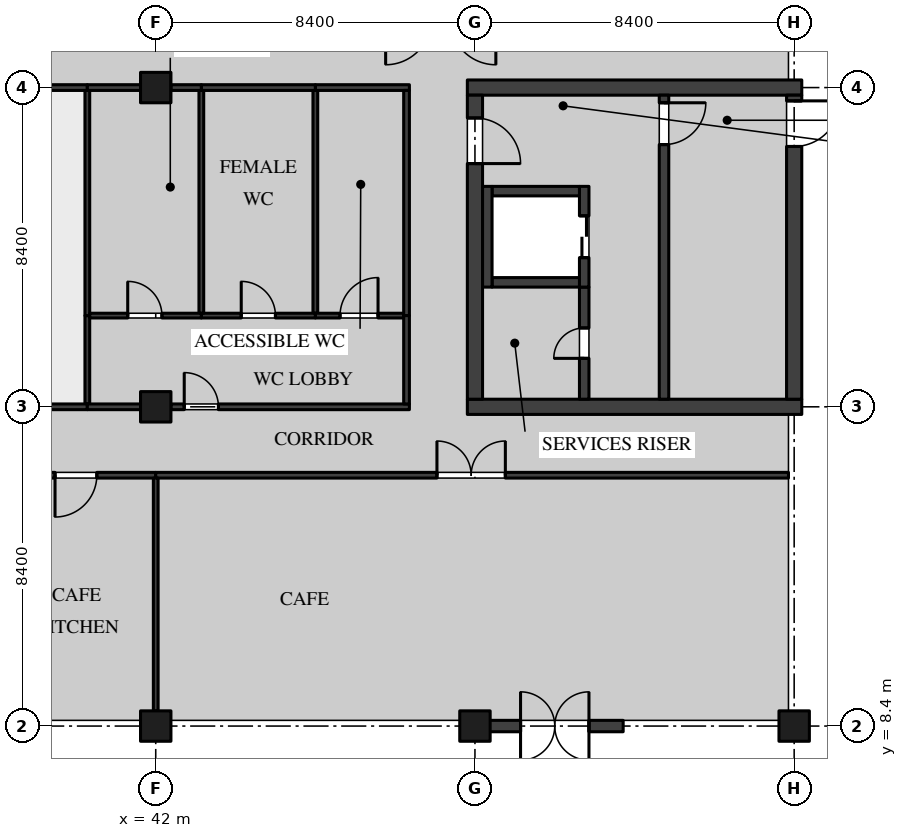
"""IFC4 building model, lengths in metres.
Left out: names, types, materials, properties, quantities, classifications, styles, units other than length and angle.
Written with IfcOpenShell. Run it as: python <this file> out.ifc"""

import sys

from ifc_helpers import new_model, si_unit, direction, frame, frame_2d, origin, origin_2d, place, context, subcontext, project, spatial, rectangle, extrude, element, fill, save


model = new_model("IFC4")
c1 = context("Model", 3, precision=1e-05, world=origin(), true_north=direction((0.0, 1.0)))
c2 = subcontext(c1, "Body", "Model", "MODEL_VIEW")
j1 = project(units=[si_unit("LENGTHUNIT", "METRE"), si_unit("PLANEANGLEUNIT", "RADIAN")], contexts=[c1])
p1 = place(None, origin())
s1 = spatial("IfcSite", under=j1, at=p1, CompositionType="ELEMENT")
p2 = place(p1, origin())
s2 = spatial("IfcBuilding", under=s1, at=p2, CompositionType="ELEMENT")
p3 = place(p2, origin())
s3 = spatial("IfcBuildingStorey", under=s2, at=p3, CompositionType="ELEMENT", Elevation=0.0)
for number, where, z_axis, x_axis in (
    (1, (42.0, 8.4, 0.0), (0.0, 0.0, 1.0), (1.0, 0.0, 0.0)),
    (2, (42.0, 16.8, 0.0), (0.0, 0.0, 1.0), (1.0, 0.0, 0.0)),
    (3, (42.0, 25.2, 0.0), (0.0, 0.0, 1.0), (1.0, 0.0, 0.0)),
    (4, (50.4, 8.4, 0.0), (0.0, 0.0, 1.0), (1.0, 0.0, 0.0)),
    (5, (58.8, 8.4, 0.0), (0.0, 0.0, 1.0), (1.0, 0.0, 0.0)),
):
    element("IfcColumn", number, at=place(p3, frame(where, z_axis=z_axis, x_axis=x_axis)), inside=s3, PredefinedType="COLUMN", context=c2, shape_type="SweptSolid", body=[
        extrude(rectangle(XDim=0.8, YDim=0.8, at=origin_2d()), origin(), (0.0, 0.0, 1.0), 5.05),
    ])
for number, where, z_axis, x_axis in (
    (6, (50.2, 16.8, 0.0), (0.0, 0.0, 1.0), (1.0, 0.0, 0.0)),
    (7, (50.2, 25.2, 0.0), (0.0, 0.0, 1.0), (1.0, 0.0, 0.0)),
):
    element("IfcWall", number, at=place(p3, frame(where, z_axis=z_axis, x_axis=x_axis)), inside=s3, PredefinedType="SHEAR", context=c2, shape_type="SweptSolid", body=[
        extrude(rectangle(XDim=8.8, YDim=0.4, at=frame_2d((4.4, 0.0))), origin(), (0.0, 0.0, 1.0), 5.05),
    ])
p4 = place(p3, frame((50.4, 17.0, 0.0), z_axis=(0.0, 0.0, 1.0), x_axis=(0.0, 1.0, 0.0)))
e8 = element("IfcWall", 8, at=p4, inside=s3, PredefinedType="SHEAR", context=c2, shape_type="SweptSolid", body=[
    extrude(rectangle(XDim=8.0, YDim=0.4, at=frame_2d((4.0, 0.0))), origin(), (0.0, 0.0, 1.0), 5.05),
])
p5 = place(p4, frame((6.2, 0.0, 0.0)))
e9 = element("IfcOpeningElement", 9, at=p5, cuts=e8, PredefinedType="OPENING", context=c2, shape_type="SweptSolid", body=[
    extrude(rectangle(XDim=1.2, YDim=2.1, at=frame_2d((0.6, 1.05))), frame((0.0, 0.21, 0.0), z_axis=(0.0, -1.0, 0.0), x_axis=(1.0, 0.0, 0.0)), (0.0, 0.0, 1.0), 0.42),
])
p6 = place(p3, frame((58.8, 17.0, 0.0), z_axis=(0.0, 0.0, 1.0), x_axis=(0.0, 1.0, 0.0)))
e10 = element("IfcWall", 10, at=p6, inside=s3, PredefinedType="SHEAR", context=c2, shape_type="SweptSolid", body=[
    extrude(rectangle(XDim=8.0, YDim=0.4, at=frame_2d((4.0, 0.0))), origin(), (0.0, 0.0, 1.0), 5.05),
])
p7 = place(p6, frame((6.65, 0.0, 0.0)))
e11 = element("IfcOpeningElement", 11, at=p7, cuts=e10, PredefinedType="OPENING", context=c2, shape_type="SweptSolid", body=[
    extrude(rectangle(XDim=1.2, YDim=2.1, at=frame_2d((0.6, 1.05))), frame((0.0, 0.21, 0.0), z_axis=(0.0, -1.0, 0.0), x_axis=(1.0, 0.0, 0.0)), (0.0, 0.0, 1.0), 0.42),
])
p8 = place(p3, frame((55.375, 25.0, 0.0), z_axis=(0.0, 0.0, 1.0), x_axis=(0.0, -1.0, 0.0)))
e12 = element("IfcWall", 12, at=p8, inside=s3, PredefinedType="SOLIDWALL", context=c2, shape_type="SweptSolid", body=[
    extrude(rectangle(XDim=8.0, YDim=0.25, at=frame_2d((4.0, 0.0))), origin(), (0.0, 0.0, 1.0), 5.05),
])
p9 = place(p8, frame((0.2, 0.0, 0.0)))
e13 = element("IfcOpeningElement", 13, at=p9, cuts=e12, PredefinedType="OPENING", context=c2, shape_type="SweptSolid", body=[
    extrude(rectangle(XDim=1.1, YDim=2.1, at=frame_2d((0.55, 1.05))), frame((0.0, 0.135, 0.0), z_axis=(0.0, -1.0, 0.0), x_axis=(1.0, 0.0, 0.0)), (0.0, 0.0, 1.0), 0.27),
])
p10 = place(p3, frame((53.275, 19.95, 0.0), z_axis=(0.0, 0.0, 1.0), x_axis=(0.0, -1.0, 0.0)))
e14 = element("IfcWall", 14, at=p10, inside=s3, PredefinedType="SOLIDWALL", context=c2, shape_type="SweptSolid", body=[
    extrude(rectangle(XDim=2.95, YDim=0.25, at=frame_2d((1.475, 0.0))), origin(), (0.0, 0.0, 1.0), 5.05),
])
p11 = place(p10, frame((1.075, 0.0, 0.0)))
e15 = element("IfcOpeningElement", 15, at=p11, cuts=e14, PredefinedType="OPENING", context=c2, shape_type="SweptSolid", body=[
    extrude(rectangle(XDim=0.8, YDim=2.1, at=frame_2d((0.4, 1.05))), frame((0.0, 0.135, 0.0), z_axis=(0.0, -1.0, 0.0), x_axis=(1.0, 0.0, 0.0)), (0.0, 0.0, 1.0), 0.27),
])
p12 = place(p3, frame((53.275, 19.95, 0.0), z_axis=(0.0, 0.0, 1.0), x_axis=(0.0, 1.0, 0.0)))
e16 = element("IfcWall", 16, at=p12, inside=s3, PredefinedType="SOLIDWALL", context=c2, shape_type="SweptSolid", body=[
    extrude(rectangle(XDim=2.65, YDim=0.25, at=frame_2d((1.325, 0.0))), origin(), (0.0, 0.0, 1.0), 5.05),
])
p13 = place(p12, frame((0.775, 0.0, 0.0)))
e17 = element("IfcOpeningElement", 17, at=p13, cuts=e16, PredefinedType="OPENING", context=c2, shape_type="SweptSolid", body=[
    extrude(rectangle(XDim=1.1, YDim=2.1, at=frame_2d((0.55, 1.05))), frame((0.0, 0.135, 0.0), z_axis=(0.0, -1.0, 0.0), x_axis=(1.0, 0.0, 0.0)), (0.0, 0.0, 1.0), 0.27),
])
for number, where, z_axis, x_axis in (
    (18, (50.85, 22.475, 0.0), (0.0, 0.0, 1.0), (1.0, 0.0, 0.0)),
    (19, (50.85, 20.075, 0.0), (0.0, 0.0, 1.0), (1.0, 0.0, 0.0)),
):
    element("IfcWall", number, at=place(p3, frame(where, z_axis=z_axis, x_axis=x_axis)), inside=s3, PredefinedType="SOLIDWALL", context=c2, shape_type="SweptSolid", body=[
        extrude(rectangle(XDim=2.3, YDim=0.25, at=frame_2d((1.15, 0.0))), origin(), (0.0, 0.0, 1.0), 5.05),
    ])
p14 = place(p3, frame((50.725, 19.95, 0.0), z_axis=(0.0, 0.0, 1.0), x_axis=(0.0, 1.0, 0.0)))
e20 = element("IfcWall", 20, at=p14, inside=s3, PredefinedType="SOLIDWALL", context=c2, shape_type="SweptSolid", body=[
    extrude(rectangle(XDim=2.65, YDim=0.25, at=frame_2d((1.325, 0.0))), origin(), (0.0, 0.0, 1.0), 5.05),
])
p15 = place(p3, frame((40.2, 16.875, 0.0), z_axis=(0.0, 0.0, 1.0), x_axis=(0.0, 1.0, 0.0)))
e21 = element("IfcWall", 21, at=p15, inside=s3, PredefinedType="PARTITIONING", context=c2, shape_type="SweptSolid", body=[
    extrude(rectangle(XDim=2.325, YDim=0.125, at=frame_2d((1.163, 0.0))), origin(), (0.0, 0.0, 1.0), 5.05),
])
p16 = place(p3, frame((40.2, 19.2, 0.0), z_axis=(0.0, 0.0, 1.0), x_axis=(0.0, 1.0, 0.0)))
e22 = element("IfcWall", 22, at=p16, inside=s3, PredefinedType="PARTITIONING", context=c2, shape_type="SweptSolid", body=[
    extrude(rectangle(XDim=5.925, YDim=0.125, at=frame_2d((2.962, 0.0))), origin(), (0.0, 0.0, 1.0), 5.05),
])
p17 = place(p3, frame((34.0, 16.8, 0.0), z_axis=(0.0, 0.0, 1.0), x_axis=(1.0, 0.0, 0.0)))
e23 = element("IfcWall", 23, at=p17, inside=s3, PredefinedType="PARTITIONING", context=c2, shape_type="SweptSolid", body=[
    extrude(rectangle(XDim=6.2, YDim=0.15, at=frame_2d((3.1, 0.0))), origin(), (0.0, 0.0, 1.0), 5.05),
])
p18 = place(p17, frame((1.9, 0.0, 0.0)))
e24 = element("IfcOpeningElement", 24, at=p18, cuts=e23, PredefinedType="OPENING", context=c2, shape_type="SweptSolid", body=[
    extrude(rectangle(XDim=2.4, YDim=2.7, at=frame_2d((1.2, 1.35))), frame((0.0, 0.085, 0.0), z_axis=(0.0, -1.0, 0.0), x_axis=(1.0, 0.0, 0.0)), (0.0, 0.0, 1.0), 0.17),
])
p19 = place(p3, frame((34.0, 25.2, 0.0), z_axis=(0.0, 0.0, 1.0), x_axis=(1.0, 0.0, 0.0)))
e25 = element("IfcWall", 25, at=p19, inside=s3, PredefinedType="PARTITIONING", context=c2, shape_type="SweptSolid", body=[
    extrude(rectangle(XDim=6.2, YDim=0.15, at=frame_2d((3.1, 0.0))), origin(), (0.0, 0.0, 1.0), 5.05),
])
p20 = place(p3, frame((46.2, 19.262, 0.0), z_axis=(0.0, 0.0, 1.0), x_axis=(0.0, 1.0, 0.0)))
e26 = element("IfcWall", 26, at=p20, inside=s3, PredefinedType="PARTITIONING", context=c2, shape_type="SweptSolid", body=[
    extrude(rectangle(XDim=5.863, YDim=0.125, at=frame_2d((2.932, 0.0))), origin(), (0.0, 0.0, 1.0), 5.05),
])
p21 = place(p3, frame((46.2, 19.2, 0.0), z_axis=(0.0, 0.0, 1.0), x_axis=(1.0, 0.0, 0.0)))
e27 = element("IfcWall", 27, at=p21, inside=s3, PredefinedType="PARTITIONING", context=c2, shape_type="SweptSolid", body=[
    extrude(rectangle(XDim=2.325, YDim=0.125, at=frame_2d((1.163, 0.0))), origin(), (0.0, 0.0, 1.0), 5.05),
])
p22 = place(p21, frame((0.65, 0.0, 0.0)))
e28 = element("IfcOpeningElement", 28, at=p22, cuts=e27, PredefinedType="OPENING", context=c2, shape_type="SweptSolid", body=[
    extrude(rectangle(XDim=1.0, YDim=2.1, at=frame_2d((0.5, 1.05))), frame((0.0, 0.073, 0.0), z_axis=(0.0, -1.0, 0.0), x_axis=(1.0, 0.0, 0.0)), (0.0, 0.0, 1.0), 0.145),
])
p23 = place(p3, frame((46.2, 25.2, 0.0), z_axis=(0.0, 0.0, 1.0), x_axis=(1.0, 0.0, 0.0)))
e29 = element("IfcWall", 29, at=p23, inside=s3, PredefinedType="PARTITIONING", context=c2, shape_type="SweptSolid", body=[
    extrude(rectangle(XDim=2.475, YDim=0.15, at=frame_2d((1.238, 0.0))), origin(), (0.0, 0.0, 1.0), 5.05),
])
p24 = place(p3, frame((48.6, 19.2, 0.0), z_axis=(0.0, 0.0, 1.0), x_axis=(0.0, 1.0, 0.0)))
e30 = element("IfcWall", 30, at=p24, inside=s3, PredefinedType="PARTITIONING", context=c2, shape_type="SweptSolid", body=[
    extrude(rectangle(XDim=5.925, YDim=0.15, at=frame_2d((2.962, 0.0))), origin(), (0.0, 0.0, 1.0), 5.05),
])
p25 = place(p3, frame((43.2, 19.2, 0.0), z_axis=(0.0, 0.0, 1.0), x_axis=(1.0, 0.0, 0.0)))
e31 = element("IfcWall", 31, at=p25, inside=s3, PredefinedType="PARTITIONING", context=c2, shape_type="SweptSolid", body=[
    extrude(rectangle(XDim=3.0, YDim=0.125, at=frame_2d((1.5, 0.0))), origin(), (0.0, 0.0, 1.0), 5.05),
])
p26 = place(p25, frame((1.05, 0.0, 0.0)))
e32 = element("IfcOpeningElement", 32, at=p26, cuts=e31, PredefinedType="OPENING", context=c2, shape_type="SweptSolid", body=[
    extrude(rectangle(XDim=0.9, YDim=2.1, at=frame_2d((0.45, 1.05))), frame((0.0, 0.073, 0.0), z_axis=(0.0, -1.0, 0.0), x_axis=(1.0, 0.0, 0.0)), (0.0, 0.0, 1.0), 0.145),
])
p27 = place(p3, frame((43.2, 19.262, 0.0), z_axis=(0.0, 0.0, 1.0), x_axis=(0.0, 1.0, 0.0)))
e33 = element("IfcWall", 33, at=p27, inside=s3, PredefinedType="PARTITIONING", context=c2, shape_type="SweptSolid", body=[
    extrude(rectangle(XDim=5.863, YDim=0.125, at=frame_2d((2.932, 0.0))), origin(), (0.0, 0.0, 1.0), 5.05),
])
p28 = place(p3, frame((43.2, 25.2, 0.0), z_axis=(0.0, 0.0, 1.0), x_axis=(1.0, 0.0, 0.0)))
e34 = element("IfcWall", 34, at=p28, inside=s3, PredefinedType="PARTITIONING", context=c2, shape_type="SweptSolid", body=[
    extrude(rectangle(XDim=3.0, YDim=0.15, at=frame_2d((1.5, 0.0))), origin(), (0.0, 0.0, 1.0), 5.05),
])
p29 = place(p3, frame((40.263, 19.2, 0.0), z_axis=(0.0, 0.0, 1.0), x_axis=(1.0, 0.0, 0.0)))
e35 = element("IfcWall", 35, at=p29, inside=s3, PredefinedType="PARTITIONING", context=c2, shape_type="SweptSolid", body=[
    extrude(rectangle(XDim=2.937, YDim=0.125, at=frame_2d((1.469, 0.0))), origin(), (0.0, 0.0, 1.0), 5.05),
])
p30 = place(p29, frame((1.0, 0.0, 0.0)))
e36 = element("IfcOpeningElement", 36, at=p30, cuts=e35, PredefinedType="OPENING", context=c2, shape_type="SweptSolid", body=[
    extrude(rectangle(XDim=0.9, YDim=2.1, at=frame_2d((0.45, 1.05))), frame((0.0, 0.073, 0.0), z_axis=(0.0, -1.0, 0.0), x_axis=(1.0, 0.0, 0.0)), (0.0, 0.0, 1.0), 0.145),
])
p31 = place(p3, frame((40.2, 16.8, 0.0), z_axis=(0.0, 0.0, 1.0), x_axis=(1.0, 0.0, 0.0)))
e37 = element("IfcWall", 37, at=p31, inside=s3, PredefinedType="PARTITIONING", context=c2, shape_type="SweptSolid", body=[
    extrude(rectangle(XDim=1.4, YDim=0.15, at=frame_2d((0.7, 0.0))), origin(), (0.0, 0.0, 1.0), 5.05),
])
p32 = place(p3, frame((42.4, 16.8, 0.0), z_axis=(0.0, 0.0, 1.0), x_axis=(1.0, 0.0, 0.0)))
e38 = element("IfcWall", 38, at=p32, inside=s3, PredefinedType="PARTITIONING", context=c2, shape_type="SweptSolid", body=[
    extrude(rectangle(XDim=6.275, YDim=0.15, at=frame_2d((3.138, 0.0))), origin(), (0.0, 0.0, 1.0), 5.05),
])
p33 = place(p32, frame((0.35, 0.0, 0.0)))
e39 = element("IfcOpeningElement", 39, at=p33, cuts=e38, PredefinedType="OPENING", context=c2, shape_type="SweptSolid", body=[
    extrude(rectangle(XDim=0.9, YDim=2.1, at=frame_2d((0.45, 1.05))), frame((0.0, 0.085, 0.0), z_axis=(0.0, -1.0, 0.0), x_axis=(1.0, 0.0, 0.0)), (0.0, 0.0, 1.0), 0.17),
])
p34 = place(p3, frame((48.6, 16.875, 0.0), z_axis=(0.0, 0.0, 1.0), x_axis=(0.0, 1.0, 0.0)))
e40 = element("IfcWall", 40, at=p34, inside=s3, PredefinedType="PARTITIONING", context=c2, shape_type="SweptSolid", body=[
    extrude(rectangle(XDim=2.325, YDim=0.15, at=frame_2d((1.163, 0.0))), origin(), (0.0, 0.0, 1.0), 5.05),
])
p35 = place(p3, frame((40.2, 25.2, 0.0), z_axis=(0.0, 0.0, 1.0), x_axis=(1.0, 0.0, 0.0)))
e41 = element("IfcWall", 41, at=p35, inside=s3, PredefinedType="PARTITIONING", context=c2, shape_type="SweptSolid", body=[
    extrude(rectangle(XDim=1.4, YDim=0.15, at=frame_2d((0.7, 0.0))), origin(), (0.0, 0.0, 1.0), 5.05),
])
p36 = place(p3, frame((42.4, 25.2, 0.0), z_axis=(0.0, 0.0, 1.0), x_axis=(1.0, 0.0, 0.0)))
e42 = element("IfcWall", 42, at=p36, inside=s3, PredefinedType="PARTITIONING", context=c2, shape_type="SweptSolid", body=[
    extrude(rectangle(XDim=0.8, YDim=0.15, at=frame_2d((0.4, 0.0))), origin(), (0.0, 0.0, 1.0), 5.05),
])
p37 = place(p3, frame((37.8, 15.0, 0.0), z_axis=(0.0, 0.0, 1.0), x_axis=(1.0, 0.0, 0.0)))
e43 = element("IfcWall", 43, at=p37, inside=s3, PredefinedType="PARTITIONING", context=c2, shape_type="SweptSolid", body=[
    extrude(rectangle(XDim=4.2, YDim=0.15, at=frame_2d((2.1, 0.0))), origin(), (0.0, 0.0, 1.0), 5.05),
])
p38 = place(p37, frame((1.55, 0.0, 0.0)))
e44 = element("IfcOpeningElement", 44, at=p38, cuts=e43, PredefinedType="OPENING", context=c2, shape_type="SweptSolid", body=[
    extrude(rectangle(XDim=1.1, YDim=2.1, at=frame_2d((0.55, 1.05))), frame((0.0, 0.085, 0.0), z_axis=(0.0, -1.0, 0.0), x_axis=(1.0, 0.0, 0.0)), (0.0, 0.0, 1.0), 0.17),
])
p39 = place(p3, frame((42.0, 15.0, 0.0), z_axis=(0.0, 0.0, 1.0), x_axis=(1.0, 0.0, 0.0)))
e45 = element("IfcWall", 45, at=p39, inside=s3, PredefinedType="PARTITIONING", context=c2, shape_type="SweptSolid", body=[
    extrude(rectangle(XDim=16.65, YDim=0.15, at=frame_2d((8.325, 0.0))), origin(), (0.0, 0.0, 1.0), 5.05),
])
p40 = place(p39, frame((7.4, 0.0, 0.0)))
e46 = element("IfcOpeningElement", 46, at=p40, cuts=e45, PredefinedType="OPENING", context=c2, shape_type="SweptSolid", body=[
    extrude(rectangle(XDim=1.8, YDim=2.4, at=frame_2d((0.9, 1.2))), frame((0.0, 0.085, 0.0), z_axis=(0.0, -1.0, 0.0), x_axis=(1.0, 0.0, 0.0)), (0.0, 0.0, 1.0), 0.17),
])
p41 = place(p3, frame((42.0, 8.8, 0.0), z_axis=(0.0, 0.0, 1.0), x_axis=(0.0, 1.0, 0.0)))
e47 = element("IfcWall", 47, at=p41, inside=s3, PredefinedType="PARTITIONING", context=c2, shape_type="SweptSolid", body=[
    extrude(rectangle(XDim=6.125, YDim=0.125, at=frame_2d((3.062, 0.0))), origin(), (0.0, 0.0, 1.0), 5.05),
])
p42 = place(p3, frame((50.78, 8.4, 0.0), z_axis=(0.0, 0.0, 1.0), x_axis=(1.0, 0.0, 0.0)))
e48 = element("IfcWall", 48, at=p42, inside=s3, PredefinedType="SOLIDWALL", context=c2, shape_type="SweptSolid", body=[
    extrude(rectangle(XDim=3.52, YDim=0.3, at=frame_2d((1.76, 0.0))), origin(), (0.0, 0.0, 1.0), 5.05),
])
p43 = place(p42, frame((0.82, 0.0, 0.0)))
e49 = element("IfcOpeningElement", 49, at=p43, cuts=e48, PredefinedType="OPENING", context=c2, shape_type="SweptSolid", body=[
    extrude(rectangle(XDim=1.8, YDim=2.4, at=frame_2d((0.9, 1.2))), frame((0.0, 0.16, 0.0), z_axis=(0.0, -1.0, 0.0), x_axis=(1.0, 0.0, 0.0)), (0.0, 0.0, 1.0), 0.32),
])
p44 = place(p5, frame((1.2, 0.0, 0.0), z_axis=(0.0, 0.0, 1.0), x_axis=(-1.0, 0.0, 0.0)))
e50 = element("IfcDoor", 50, at=p44, inside=s3, OperationType="SINGLE_SWING_LEFT", PredefinedType="DOOR", context=c2, shape_type="SweptSolid", body=[
    extrude(rectangle(XDim=1.2, YDim=2.1, at=frame_2d((0.6, 1.05))), frame((0.0, 0.035, 0.0), z_axis=(0.0, -1.0, 0.0), x_axis=(1.0, 0.0, 0.0)), (0.0, 0.0, 1.0), 0.07),
])
fill(e9, e50)
p45 = place(p11, frame((0.8, 0.0, 0.0), z_axis=(0.0, 0.0, 1.0), x_axis=(-1.0, 0.0, 0.0)))
e51 = element("IfcDoor", 51, at=p45, inside=s3, OperationType="SINGLE_SWING_RIGHT", PredefinedType="DOOR", context=c2, shape_type="SweptSolid", body=[
    extrude(rectangle(XDim=0.8, YDim=2.1, at=frame_2d((0.4, 1.05))), frame((0.0, 0.035, 0.0), z_axis=(0.0, -1.0, 0.0), x_axis=(1.0, 0.0, 0.0)), (0.0, 0.0, 1.0), 0.07),
])
fill(e15, e51)
p46 = place(p9, origin())
e52 = element("IfcDoor", 52, at=p46, inside=s3, OperationType="SINGLE_SWING_RIGHT", PredefinedType="DOOR", context=c2, shape_type="SweptSolid", body=[
    extrude(rectangle(XDim=1.1, YDim=2.1, at=frame_2d((0.55, 1.05))), frame((0.0, 0.035, 0.0), z_axis=(0.0, -1.0, 0.0), x_axis=(1.0, 0.0, 0.0)), (0.0, 0.0, 1.0), 0.07),
])
fill(e13, e52)
p47 = place(p7, frame((1.2, 0.0, 0.0), z_axis=(0.0, 0.0, 1.0), x_axis=(-1.0, 0.0, 0.0)))
e53 = element("IfcDoor", 53, at=p47, inside=s3, OperationType="SINGLE_SWING_RIGHT", PredefinedType="DOOR", context=c2, shape_type="SweptSolid", body=[
    extrude(rectangle(XDim=1.2, YDim=2.1, at=frame_2d((0.6, 1.05))), frame((0.0, 0.035, 0.0), z_axis=(0.0, -1.0, 0.0), x_axis=(1.0, 0.0, 0.0)), (0.0, 0.0, 1.0), 0.07),
])
fill(e11, e53)
p48 = place(p13, origin())
e54 = element("IfcDoor", 54, at=p48, inside=s3, OperationType="DOUBLE_DOOR_SLIDING", PredefinedType="DOOR", context=c2, shape_type="SweptSolid", body=[
    extrude(rectangle(XDim=1.1, YDim=2.1, at=frame_2d((0.55, 1.05))), frame((0.0, 0.04, 0.0), z_axis=(0.0, -1.0, 0.0), x_axis=(1.0, 0.0, 0.0)), (0.0, 0.0, 1.0), 0.08),
])
fill(e17, e54)
p49 = place(p22, origin())
e55 = element("IfcDoor", 55, at=p49, inside=s3, OperationType="SINGLE_SWING_LEFT", PredefinedType="DOOR", context=c2, shape_type="SweptSolid", body=[
    extrude(rectangle(XDim=1.0, YDim=2.1, at=frame_2d((0.5, 1.05))), frame((0.0, 0.02, 0.0), z_axis=(0.0, -1.0, 0.0), x_axis=(1.0, 0.0, 0.0)), (0.0, 0.0, 1.0), 0.04),
])
fill(e28, e55)
p50 = place(p26, origin())
e56 = element("IfcDoor", 56, at=p50, inside=s3, OperationType="SINGLE_SWING_RIGHT", PredefinedType="DOOR", context=c2, shape_type="SweptSolid", body=[
    extrude(rectangle(XDim=0.9, YDim=2.1, at=frame_2d((0.45, 1.05))), frame((0.0, 0.02, 0.0), z_axis=(0.0, -1.0, 0.0), x_axis=(1.0, 0.0, 0.0)), (0.0, 0.0, 1.0), 0.04),
])
fill(e32, e56)
p51 = place(p33, origin())
e57 = element("IfcDoor", 57, at=p51, inside=s3, OperationType="SINGLE_SWING_RIGHT", PredefinedType="DOOR", context=c2, shape_type="SweptSolid", body=[
    extrude(rectangle(XDim=0.9, YDim=2.1, at=frame_2d((0.45, 1.05))), frame((0.0, 0.025, 0.0), z_axis=(0.0, -1.0, 0.0), x_axis=(1.0, 0.0, 0.0)), (0.0, 0.0, 1.0), 0.05),
])
fill(e39, e57)
p52 = place(p30, origin())
e58 = element("IfcDoor", 58, at=p52, inside=s3, OperationType="SINGLE_SWING_RIGHT", PredefinedType="DOOR", context=c2, shape_type="SweptSolid", body=[
    extrude(rectangle(XDim=0.9, YDim=2.1, at=frame_2d((0.45, 1.05))), frame((0.0, 0.02, 0.0), z_axis=(0.0, -1.0, 0.0), x_axis=(1.0, 0.0, 0.0)), (0.0, 0.0, 1.0), 0.04),
])
fill(e36, e58)
p53 = place(p38, frame((1.1, 0.0, 0.0), z_axis=(0.0, 0.0, 1.0), x_axis=(-1.0, 0.0, 0.0)))
e59 = element("IfcDoor", 59, at=p53, inside=s3, OperationType="SINGLE_SWING_LEFT", PredefinedType="DOOR", context=c2, shape_type="SweptSolid", body=[
    extrude(rectangle(XDim=1.1, YDim=2.1, at=frame_2d((0.55, 1.05))), frame((0.0, 0.025, 0.0), z_axis=(0.0, -1.0, 0.0), x_axis=(1.0, 0.0, 0.0)), (0.0, 0.0, 1.0), 0.05),
])
fill(e44, e59)
p54 = place(p40, origin())
e60 = element("IfcDoor", 60, at=p54, inside=s3, OperationType="DOUBLE_DOOR_SINGLE_SWING", PredefinedType="DOOR", context=c2, shape_type="SweptSolid", body=[
    extrude(rectangle(XDim=1.8, YDim=2.4, at=frame_2d((0.9, 1.2))), frame((0.0, 0.025, 0.0), z_axis=(0.0, -1.0, 0.0), x_axis=(1.0, 0.0, 0.0)), (0.0, 0.0, 1.0), 0.05),
])
fill(e46, e60)
p55 = place(p43, frame((1.8, 0.0, 0.0), z_axis=(0.0, 0.0, 1.0), x_axis=(-1.0, 0.0, 0.0)))
e61 = element("IfcDoor", 61, at=p55, inside=s3, OperationType="DOUBLE_DOOR_DOUBLE_SWING", PredefinedType="DOOR", context=c2, shape_type="SweptSolid", body=[
    extrude(rectangle(XDim=1.8, YDim=2.4, at=frame_2d((0.9, 1.2))), frame((0.0, 0.025, 0.0), z_axis=(0.0, -1.0, 0.0), x_axis=(1.0, 0.0, 0.0)), (0.0, 0.0, 1.0), 0.05),
])
fill(e49, e61)
save(model, sys.argv[1])
